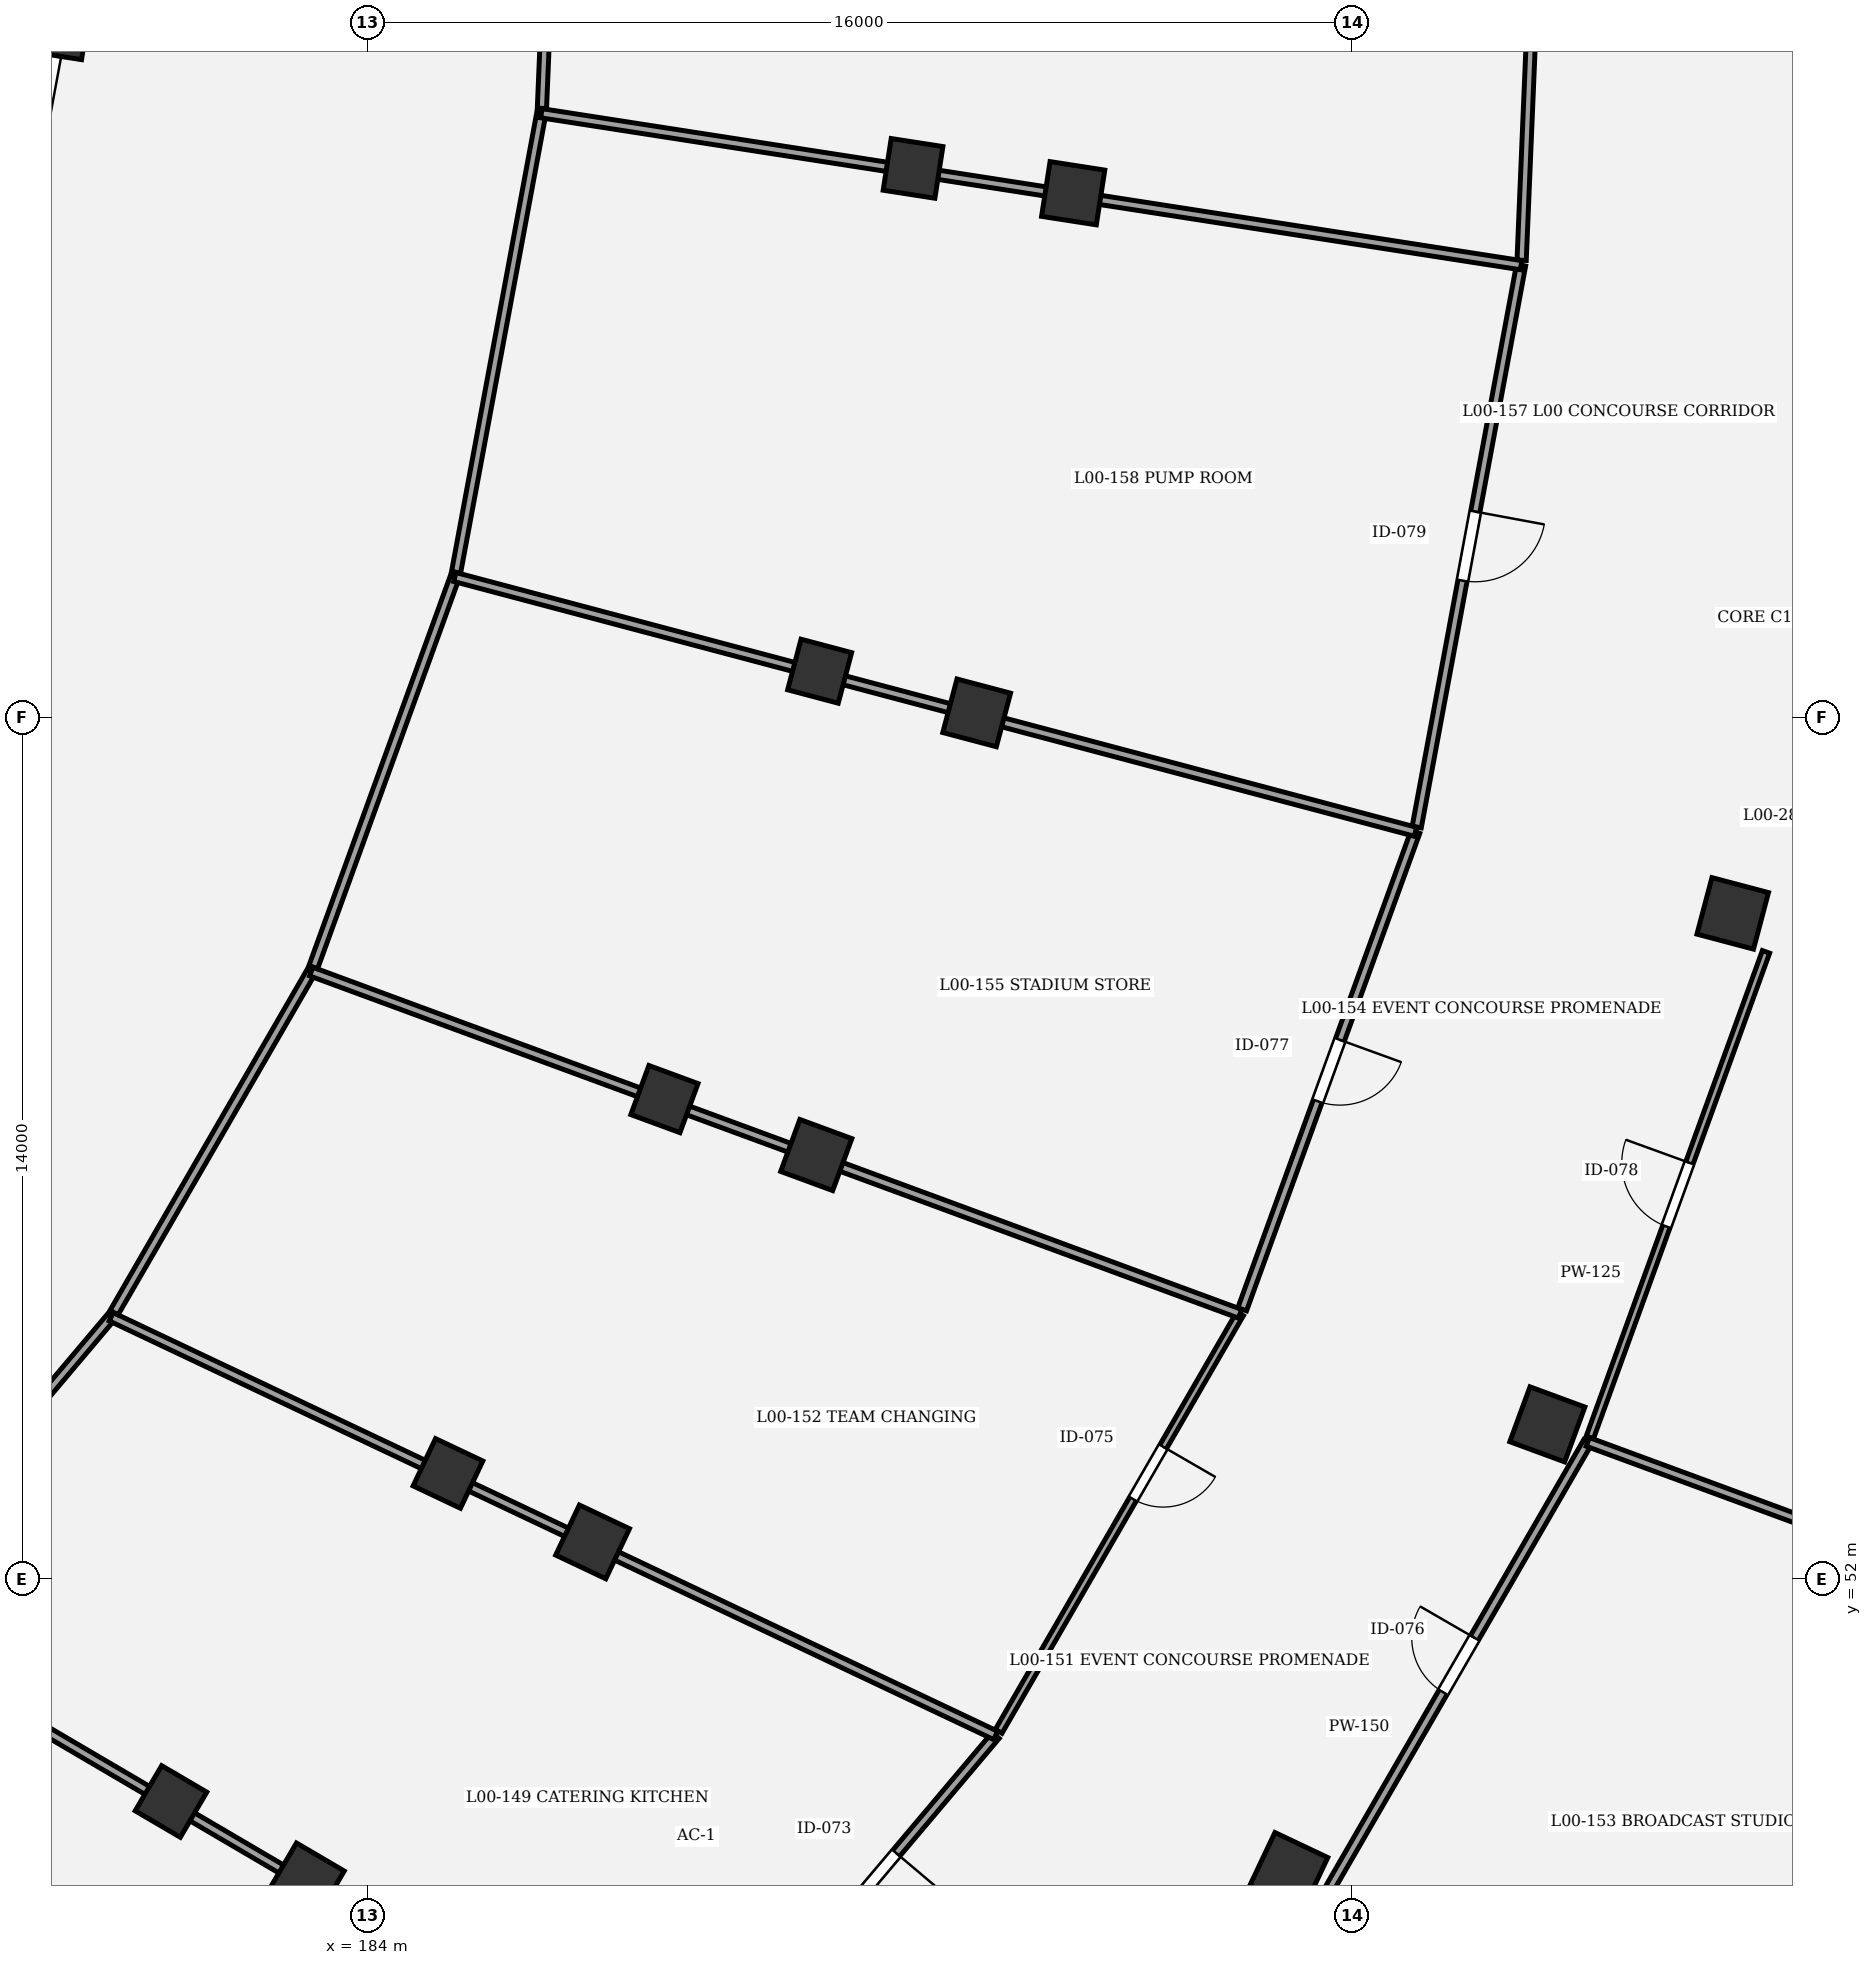
"""IFC4 building model, lengths in metres.
Left out: names, types, materials, properties, quantities, classifications, styles, units other than length and angle.
Written with IfcOpenShell. Run it as: python <this file> out.ifc"""

import sys

from ifc_helpers import new_model, si_unit, direction, frame, frame_2d, origin, origin_2d, place, context, subcontext, project, spatial, rectangle, extrude, element, fill, save


model = new_model("IFC4")
c1 = context("Model", 3, precision=1e-05, world=origin(), true_north=direction((0.0, 1.0)))
c2 = subcontext(c1, "Body", "Model", "MODEL_VIEW")
j1 = project(units=[si_unit("LENGTHUNIT", "METRE"), si_unit("PLANEANGLEUNIT", "RADIAN")], contexts=[c1])
p1 = place(None, origin())
s1 = spatial("IfcSite", under=j1, at=p1, CompositionType="ELEMENT")
p2 = place(p1, origin())
s2 = spatial("IfcBuilding", under=s1, at=p2, CompositionType="ELEMENT")
p3 = place(p2, origin())
s3 = spatial("IfcBuildingStorey", under=s2, at=p3, CompositionType="ELEMENT", Elevation=0.0)
p4 = place(p3, frame((180.812, 48.389, 0.0), z_axis=(0.0, 0.0, 1.0), x_axis=(0.862513669207, -0.506033764121, 0.0)))
e1 = element("IfcColumn", 1, at=p4, inside=s3, PredefinedType="COLUMN", context=c2, shape_type="SweptSolid", body=[
    extrude(rectangle(XDim=0.85, YDim=0.85, at=origin_2d()), origin(), (0.0, 0.0, 1.0), 5.4),
])
p5 = place(p3, frame((183.012, 47.098, 0.0), z_axis=(0.0, 0.0, 1.0), x_axis=(0.862513669207, -0.506033764121, 0.0)))
e2 = element("IfcColumn", 2, at=p5, inside=s3, PredefinedType="COLUMN", context=c2, shape_type="SweptSolid", body=[
    extrude(rectangle(XDim=0.9, YDim=0.9, at=origin_2d()), origin(), (0.0, 0.0, 1.0), 5.4),
])
p6 = place(p3, frame((185.313, 53.719, 0.0), z_axis=(0.0, 0.0, 1.0), x_axis=(0.903858661687, -0.4278311813, 0.0)))
e3 = element("IfcColumn", 3, at=p6, inside=s3, PredefinedType="COLUMN", context=c2, shape_type="SweptSolid", body=[
    extrude(rectangle(XDim=0.85, YDim=0.85, at=origin_2d()), origin(), (0.0, 0.0, 1.0), 5.4),
])
p7 = place(p3, frame((187.663, 52.606, 0.0), z_axis=(0.0, 0.0, 1.0), x_axis=(0.903858661687, -0.4278311813, 0.0)))
e4 = element("IfcColumn", 4, at=p7, inside=s3, PredefinedType="COLUMN", context=c2, shape_type="SweptSolid", body=[
    extrude(rectangle(XDim=0.9, YDim=0.9, at=origin_2d()), origin(), (0.0, 0.0, 1.0), 5.4),
])
p8 = place(p3, frame((198.976, 47.252, 0.0), z_axis=(0.0, 0.0, 1.0), x_axis=(0.903858661687, -0.4278311813, 0.0)))
e5 = element("IfcColumn", 5, at=p8, inside=s3, PredefinedType="COLUMN", context=c2, shape_type="SweptSolid", body=[
    extrude(rectangle(XDim=0.95, YDim=0.95, at=origin_2d()), origin(), (0.0, 0.0, 1.0), 5.4),
])
p9 = place(p3, frame((188.83, 59.801, 0.0), z_axis=(0.0, 0.0, 1.0), x_axis=(0.938372433776, -0.34562577382, 0.0)))
e6 = element("IfcColumn", 6, at=p9, inside=s3, PredefinedType="COLUMN", context=c2, shape_type="SweptSolid", body=[
    extrude(rectangle(XDim=0.85, YDim=0.85, at=origin_2d()), origin(), (0.0, 0.0, 1.0), 5.4),
])
p10 = place(p3, frame((191.297, 58.892, 0.0), z_axis=(0.0, 0.0, 1.0), x_axis=(0.938372433776, -0.34562577382, 0.0)))
e7 = element("IfcColumn", 7, at=p10, inside=s3, PredefinedType="COLUMN", context=c2, shape_type="SweptSolid", body=[
    extrude(rectangle(XDim=0.9, YDim=0.9, at=origin_2d()), origin(), (0.0, 0.0, 1.0), 5.4),
])
p11 = place(p3, frame((203.176, 54.516, 0.0), z_axis=(0.0, 0.0, 1.0), x_axis=(0.938372433776, -0.34562577382, 0.0)))
e8 = element("IfcColumn", 8, at=p11, inside=s3, PredefinedType="COLUMN", context=c2, shape_type="SweptSolid", body=[
    extrude(rectangle(XDim=0.95, YDim=0.95, at=origin_2d()), origin(), (0.0, 0.0, 1.0), 5.4),
])
p12 = place(p3, frame((191.352, 66.752, 0.0), z_axis=(0.0, 0.0, 1.0), x_axis=(0.966600102017, -0.256289373133, 0.0)))
e9 = element("IfcColumn", 9, at=p12, inside=s3, PredefinedType="COLUMN", context=c2, shape_type="SweptSolid", body=[
    extrude(rectangle(XDim=0.85, YDim=0.85, at=origin_2d()), origin(), (0.0, 0.0, 1.0), 5.4),
])
p13 = place(p3, frame((193.903, 66.076, 0.0), z_axis=(0.0, 0.0, 1.0), x_axis=(0.966600102017, -0.256289373133, 0.0)))
e10 = element("IfcColumn", 10, at=p13, inside=s3, PredefinedType="COLUMN", context=c2, shape_type="SweptSolid", body=[
    extrude(rectangle(XDim=0.9, YDim=0.9, at=origin_2d()), origin(), (0.0, 0.0, 1.0), 5.4),
])
p14 = place(p3, frame((206.188, 62.818, 0.0), z_axis=(0.0, 0.0, 1.0), x_axis=(0.966600102017, -0.256289373133, 0.0)))
e11 = element("IfcColumn", 11, at=p14, inside=s3, PredefinedType="COLUMN", context=c2, shape_type="SweptSolid", body=[
    extrude(rectangle(XDim=0.95, YDim=0.95, at=origin_2d()), origin(), (0.0, 0.0, 1.0), 5.4),
])
p15 = place(p3, frame((179.088, 77.06, 0.0), z_axis=(0.0, 0.0, 1.0), x_axis=(0.98817491911, -0.153330783737, 0.0)))
e12 = element("IfcColumn", 12, at=p15, inside=s3, PredefinedType="COLUMN", context=c2, shape_type="SweptSolid", body=[
    extrude(rectangle(XDim=0.65, YDim=0.65, at=origin_2d()), origin(), (0.0, 0.0, 1.0), 1.15),
])
p16 = place(p3, frame((192.869, 74.922, 0.0), z_axis=(0.0, 0.0, 1.0), x_axis=(0.98817491911, -0.153330783737, 0.0)))
e13 = element("IfcColumn", 13, at=p16, inside=s3, PredefinedType="COLUMN", context=c2, shape_type="SweptSolid", body=[
    extrude(rectangle(XDim=0.85, YDim=0.85, at=origin_2d()), origin(), (0.0, 0.0, 1.0), 5.4),
])
p17 = place(p3, frame((195.471, 74.518, 0.0), z_axis=(0.0, 0.0, 1.0), x_axis=(0.98817491911, -0.153330783737, 0.0)))
e14 = element("IfcColumn", 14, at=p17, inside=s3, PredefinedType="COLUMN", context=c2, shape_type="SweptSolid", body=[
    extrude(rectangle(XDim=0.9, YDim=0.9, at=origin_2d()), origin(), (0.0, 0.0, 1.0), 5.4),
])
p18 = place(p3, frame((194.212, 49.462, 0.0), z_axis=(0.0, 0.0, 1.0), x_axis=(-0.645180817826, -0.764029915847, 0.0)))
e15 = element("IfcWall", 15, at=p18, inside=s3, PredefinedType="PARTITIONING", context=c2, shape_type="SweptSolid", body=[
    extrude(rectangle(XDim=7.779, YDim=0.15, at=frame_2d((3.89, 0.0))), origin(), (0.0, 0.0, 1.0), 4.15),
])
p19 = place(p18, frame((2.504, 0.0, 0.0)))
e16 = element("IfcOpeningElement", 16, at=p19, cuts=e15, PredefinedType="OPENING", context=c2, shape_type="SweptSolid", body=[
    extrude(rectangle(XDim=0.9, YDim=2.1, at=frame_2d((0.45, 1.05))), frame((0.0, 0.085, 0.0), z_axis=(0.0, -1.0, 0.0), x_axis=(1.0, 0.0, 0.0)), (0.0, 0.0, 1.0), 0.17),
])
p20 = place(p3, frame((198.183, 56.312, 0.0), z_axis=(0.0, 0.0, 1.0), x_axis=(-0.500584301803, -0.865687794063, 0.0)))
e17 = element("IfcWall", 17, at=p20, inside=s3, PredefinedType="PARTITIONING", context=c2, shape_type="SweptSolid", body=[
    extrude(rectangle(XDim=7.837, YDim=0.125, at=frame_2d((3.918, 0.0))), origin(), (0.0, 0.0, 1.0), 4.15),
])
p21 = place(p20, frame((2.496, 0.0, 0.0)))
e18 = element("IfcOpeningElement", 18, at=p21, cuts=e17, PredefinedType="OPENING", context=c2, shape_type="SweptSolid", body=[
    extrude(rectangle(XDim=0.98, YDim=2.1, at=frame_2d((0.49, 1.05))), frame((0.0, 0.073, 0.0), z_axis=(0.0, -1.0, 0.0), x_axis=(1.0, 0.0, 0.0)), (0.0, 0.0, 1.0), 0.145),
])
p22 = place(p3, frame((199.641, 46.981, 0.0), z_axis=(0.0, 0.0, 1.0), x_axis=(0.500559280672, 0.865702262059, 0.0)))
e19 = element("IfcWall", 19, at=p22, inside=s3, PredefinedType="PARTITIONING", context=c2, shape_type="SweptSolid", body=[
    extrude(rectangle(XDim=8.375, YDim=0.15, at=frame_2d((4.187, 0.0))), origin(), (0.0, 0.0, 1.0), 4.15),
])
p23 = place(p22, frame((3.677, 0.0, 0.0)))
e20 = element("IfcOpeningElement", 20, at=p23, cuts=e19, PredefinedType="OPENING", context=c2, shape_type="SweptSolid", body=[
    extrude(rectangle(XDim=1.02, YDim=2.1, at=frame_2d((0.51, 1.05))), frame((0.0, 0.085, 0.0), z_axis=(0.0, -1.0, 0.0), x_axis=(1.0, 0.0, 0.0)), (0.0, 0.0, 1.0), 0.17),
])
p24 = place(p3, frame((201.032, 64.144, 0.0), z_axis=(0.0, 0.0, 1.0), x_axis=(-0.341044733968, -0.940047067669, 0.0)))
e21 = element("IfcWall", 21, at=p24, inside=s3, PredefinedType="PARTITIONING", context=c2, shape_type="SweptSolid", body=[
    extrude(rectangle(XDim=8.254, YDim=0.15, at=frame_2d((4.127, 0.0))), origin(), (0.0, 0.0, 1.0), 4.15),
])
p25 = place(p24, frame((3.597, 0.0, 0.0)))
e22 = element("IfcOpeningElement", 22, at=p25, cuts=e21, PredefinedType="OPENING", context=c2, shape_type="SweptSolid", body=[
    extrude(rectangle(XDim=1.06, YDim=2.1, at=frame_2d((0.53, 1.05))), frame((0.0, 0.085, 0.0), z_axis=(0.0, -1.0, 0.0), x_axis=(1.0, 0.0, 0.0)), (0.0, 0.0, 1.0), 0.17),
])
p26 = place(p3, frame((203.866, 54.304, 0.0), z_axis=(0.0, 0.0, 1.0), x_axis=(0.341044550343, 0.940047134287, 0.0)))
e23 = element("IfcWall", 23, at=p26, inside=s3, PredefinedType="PARTITIONING", context=c2, shape_type="SweptSolid", body=[
    extrude(rectangle(XDim=8.392, YDim=0.125, at=frame_2d((4.196, 0.0))), origin(), (0.0, 0.0, 1.0), 4.15),
])
p27 = place(p26, frame((3.646, 0.0, 0.0)))
e24 = element("IfcOpeningElement", 24, at=p27, cuts=e23, PredefinedType="OPENING", context=c2, shape_type="SweptSolid", body=[
    extrude(rectangle(XDim=1.1, YDim=2.1, at=frame_2d((0.55, 1.05))), frame((0.0, 0.073, 0.0), z_axis=(0.0, -1.0, 0.0), x_axis=(1.0, 0.0, 0.0)), (0.0, 0.0, 1.0), 0.145),
])
p28 = place(p3, frame((202.749, 73.349, 0.0), z_axis=(0.0, 0.0, 1.0), x_axis=(-0.182600545941, -0.983187184936, 0.0)))
e25 = element("IfcWall", 25, at=p28, inside=s3, PredefinedType="PARTITIONING", context=c2, shape_type="SweptSolid", body=[
    extrude(rectangle(XDim=9.284, YDim=0.15, at=frame_2d((4.642, 0.0))), origin(), (0.0, 0.0, 1.0), 4.15),
])
p29 = place(p28, frame((4.072, 0.0, 0.0)))
e26 = element("IfcOpeningElement", 26, at=p29, cuts=e25, PredefinedType="OPENING", context=c2, shape_type="SweptSolid", body=[
    extrude(rectangle(XDim=1.14, YDim=2.1, at=frame_2d((0.57, 1.05))), frame((0.0, 0.085, 0.0), z_axis=(0.0, -1.0, 0.0), x_axis=(1.0, 0.0, 0.0)), (0.0, 0.0, 1.0), 0.17),
])
p30 = place(p3, frame((203.325, 86.96, 0.0), z_axis=(0.0, 0.0, 1.0), x_axis=(-0.041894479342, -0.999122040894, 0.0)))
e27 = element("IfcWall", 27, at=p30, inside=s3, PredefinedType="PARTITIONING", context=c2, shape_type="SweptSolid", body=[
    extrude(rectangle(XDim=13.543, YDim=0.15, at=frame_2d((6.771, 0.0))), origin(), (0.0, 0.0, 1.0), 4.15),
])
p31 = place(p30, frame((6.182, 0.0, 0.0)))
e28 = element("IfcOpeningElement", 28, at=p31, cuts=e27, PredefinedType="OPENING", context=c2, shape_type="SweptSolid", body=[
    extrude(rectangle(XDim=1.18, YDim=2.1, at=frame_2d((0.59, 1.05))), frame((0.0, 0.085, 0.0), z_axis=(0.0, -1.0, 0.0), x_axis=(1.0, 0.0, 0.0)), (0.0, 0.0, 1.0), 0.17),
])
p32 = place(p3, frame((170.631, 47.091, 0.0), z_axis=(0.0, 0.0, 1.0), x_axis=(0.812885100642, -0.582424083597, 0.0)))
e29 = element("IfcWall", 29, at=p32, inside=s3, PredefinedType="PARTITIONING", context=c2, shape_type="SweptSolid", body=[
    extrude(rectangle(XDim=15.163, YDim=0.15, at=frame_2d((7.581, 0.0))), origin(), (0.0, 0.0, 1.0), 4.15),
])
p33 = place(p3, frame((175.685, 51.35, 0.0), z_axis=(0.0, 0.0, 1.0), x_axis=(0.862516522271, -0.50602890116, 0.0)))
e30 = element("IfcWall", 30, at=p33, inside=s3, PredefinedType="PARTITIONING", context=c2, shape_type="SweptSolid", body=[
    extrude(rectangle(XDim=15.591, YDim=0.15, at=frame_2d((7.796, 0.0))), origin(), (0.0, 0.0, 1.0), 4.15),
])
p34 = place(p3, frame((175.742, 51.41, 0.0), z_axis=(0.0, 0.0, 1.0), x_axis=(0.645182313149, 0.764028653127, 0.0)))
e31 = element("IfcWall", 31, at=p34, inside=s3, PredefinedType="PARTITIONING", context=c2, shape_type="SweptSolid", body=[
    extrude(rectangle(XDim=6.354, YDim=0.15, at=frame_2d((3.177, 0.0))), origin(), (0.0, 0.0, 1.0), 4.15),
])
p35 = place(p3, frame((179.842, 56.264, 0.0), z_axis=(0.0, 0.0, 1.0), x_axis=(0.903856618289, -0.427835498263, 0.0)))
e32 = element("IfcWall", 32, at=p35, inside=s3, PredefinedType="PARTITIONING", context=c2, shape_type="SweptSolid", body=[
    extrude(rectangle(XDim=15.899, YDim=0.15, at=frame_2d((7.95, 0.0))), origin(), (0.0, 0.0, 1.0), 4.15),
])
p36 = place(p3, frame((179.887, 56.331, 0.0), z_axis=(0.0, 0.0, 1.0), x_axis=(0.500568608351, 0.865696868617, 0.0)))
e33 = element("IfcWall", 33, at=p36, inside=s3, PredefinedType="PARTITIONING", context=c2, shape_type="SweptSolid", body=[
    extrude(rectangle(XDim=6.401, YDim=0.15, at=frame_2d((3.2, 0.0))), origin(), (0.0, 0.0, 1.0), 4.15),
])
p37 = place(p3, frame((183.091, 61.872, 0.0), z_axis=(0.0, 0.0, 1.0), x_axis=(0.938344671795, -0.345701138143, 0.0)))
e34 = element("IfcWall", 34, at=p37, inside=s3, PredefinedType="PARTITIONING", context=c2, shape_type="SweptSolid", body=[
    extrude(rectangle(XDim=16.083, YDim=0.15, at=frame_2d((8.042, 0.0))), origin(), (0.0, 0.0, 1.0), 4.15),
])
p38 = place(p3, frame((203.833, 54.231, 0.0), z_axis=(0.0, 0.0, 1.0), x_axis=(0.938352081903, -0.34568102405, 0.0)))
e35 = element("IfcWall", 35, at=p38, inside=s3, PredefinedType="PARTITIONING", context=c2, shape_type="SweptSolid", body=[
    extrude(rectangle(XDim=7.904, YDim=0.15, at=frame_2d((3.952, 0.0))), origin(), (0.0, 0.0, 1.0), 4.15),
])
p39 = place(p3, frame((183.125, 61.945, 0.0), z_axis=(0.0, 0.0, 1.0), x_axis=(0.341039355212, 0.940049019039, 0.0)))
e36 = element("IfcWall", 36, at=p39, inside=s3, PredefinedType="PARTITIONING", context=c2, shape_type="SweptSolid", body=[
    extrude(rectangle(XDim=6.742, YDim=0.15, at=frame_2d((3.371, 0.0))), origin(), (0.0, 0.0, 1.0), 4.15),
])
p40 = place(p3, frame((185.424, 68.283, 0.0), z_axis=(0.0, 0.0, 1.0), x_axis=(0.966587096108, -0.256338420135, 0.0)))
e37 = element("IfcWall", 37, at=p40, inside=s3, PredefinedType="PARTITIONING", context=c2, shape_type="SweptSolid", body=[
    extrude(rectangle(XDim=16.148, YDim=0.15, at=frame_2d((8.074, 0.0))), origin(), (0.0, 0.0, 1.0), 4.15),
])
p41 = place(p3, frame((185.445, 68.36, 0.0), z_axis=(0.0, 0.0, 1.0), x_axis=(0.182622862121, 0.983183040044, 0.0)))
e38 = element("IfcWall", 38, at=p41, inside=s3, PredefinedType="PARTITIONING", context=c2, shape_type="SweptSolid", body=[
    extrude(rectangle(XDim=7.585, YDim=0.15, at=frame_2d((3.792, 0.0))), origin(), (0.0, 0.0, 1.0), 4.15),
])
p42 = place(p3, frame((186.83, 75.818, 0.0), z_axis=(0.0, 0.0, 1.0), x_axis=(0.988184709928, -0.153267671296, 0.0)))
e39 = element("IfcWall", 39, at=p42, inside=s3, PredefinedType="PARTITIONING", context=c2, shape_type="SweptSolid", body=[
    extrude(rectangle(XDim=16.109, YDim=0.15, at=frame_2d((8.055, 0.0))), origin(), (0.0, 0.0, 1.0), 4.15),
])
p43 = place(p3, frame((186.839, 75.898, 0.0), z_axis=(0.0, 0.0, 1.0), x_axis=(0.041917617243, 0.999121070424, 0.0)))
e40 = element("IfcWall", 40, at=p43, inside=s3, PredefinedType="PARTITIONING", context=c2, shape_type="SweptSolid", body=[
    extrude(rectangle(XDim=11.072, YDim=0.15, at=frame_2d((5.536, 0.0))), origin(), (0.0, 0.0, 1.0), 4.15),
])
p44 = place(p19, origin())
e41 = element("IfcDoor", 41, at=p44, inside=s3, OperationType="SINGLE_SWING_LEFT", PredefinedType="DOOR", context=c2, shape_type="SweptSolid", body=[
    extrude(rectangle(XDim=0.9, YDim=2.1, at=frame_2d((0.45, 1.05))), frame((0.0, 0.025, 0.0), z_axis=(0.0, -1.0, 0.0), x_axis=(1.0, 0.0, 0.0)), (0.0, 0.0, 1.0), 0.05),
])
fill(e16, e41)
p45 = place(p21, origin())
e42 = element("IfcDoor", 42, at=p45, inside=s3, OperationType="SINGLE_SWING_LEFT", PredefinedType="DOOR", context=c2, shape_type="SweptSolid", body=[
    extrude(rectangle(XDim=0.98, YDim=2.1, at=frame_2d((0.49, 1.05))), frame((0.0, 0.025, 0.0), z_axis=(0.0, -1.0, 0.0), x_axis=(1.0, 0.0, 0.0)), (0.0, 0.0, 1.0), 0.05),
])
fill(e18, e42)
p46 = place(p23, origin())
e43 = element("IfcDoor", 43, at=p46, inside=s3, OperationType="SINGLE_SWING_RIGHT", PredefinedType="DOOR", context=c2, shape_type="SweptSolid", body=[
    extrude(rectangle(XDim=1.02, YDim=2.1, at=frame_2d((0.51, 1.05))), frame((0.0, 0.025, 0.0), z_axis=(0.0, -1.0, 0.0), x_axis=(1.0, 0.0, 0.0)), (0.0, 0.0, 1.0), 0.05),
])
fill(e20, e43)
p47 = place(p25, origin())
e44 = element("IfcDoor", 44, at=p47, inside=s3, OperationType="SINGLE_SWING_LEFT", PredefinedType="DOOR", context=c2, shape_type="SweptSolid", body=[
    extrude(rectangle(XDim=1.06, YDim=2.1, at=frame_2d((0.53, 1.05))), frame((0.0, 0.025, 0.0), z_axis=(0.0, -1.0, 0.0), x_axis=(1.0, 0.0, 0.0)), (0.0, 0.0, 1.0), 0.05),
])
fill(e22, e44)
p48 = place(p27, origin())
e45 = element("IfcDoor", 45, at=p48, inside=s3, OperationType="SINGLE_SWING_RIGHT", PredefinedType="DOOR", context=c2, shape_type="SweptSolid", body=[
    extrude(rectangle(XDim=1.1, YDim=2.1, at=frame_2d((0.55, 1.05))), frame((0.0, 0.025, 0.0), z_axis=(0.0, -1.0, 0.0), x_axis=(1.0, 0.0, 0.0)), (0.0, 0.0, 1.0), 0.05),
])
fill(e24, e45)
p49 = place(p29, origin())
e46 = element("IfcDoor", 46, at=p49, inside=s3, OperationType="SINGLE_SWING_LEFT", PredefinedType="DOOR", context=c2, shape_type="SweptSolid", body=[
    extrude(rectangle(XDim=1.14, YDim=2.1, at=frame_2d((0.57, 1.05))), frame((0.0, 0.025, 0.0), z_axis=(0.0, -1.0, 0.0), x_axis=(1.0, 0.0, 0.0)), (0.0, 0.0, 1.0), 0.05),
])
fill(e26, e46)
save(model, sys.argv[1])
